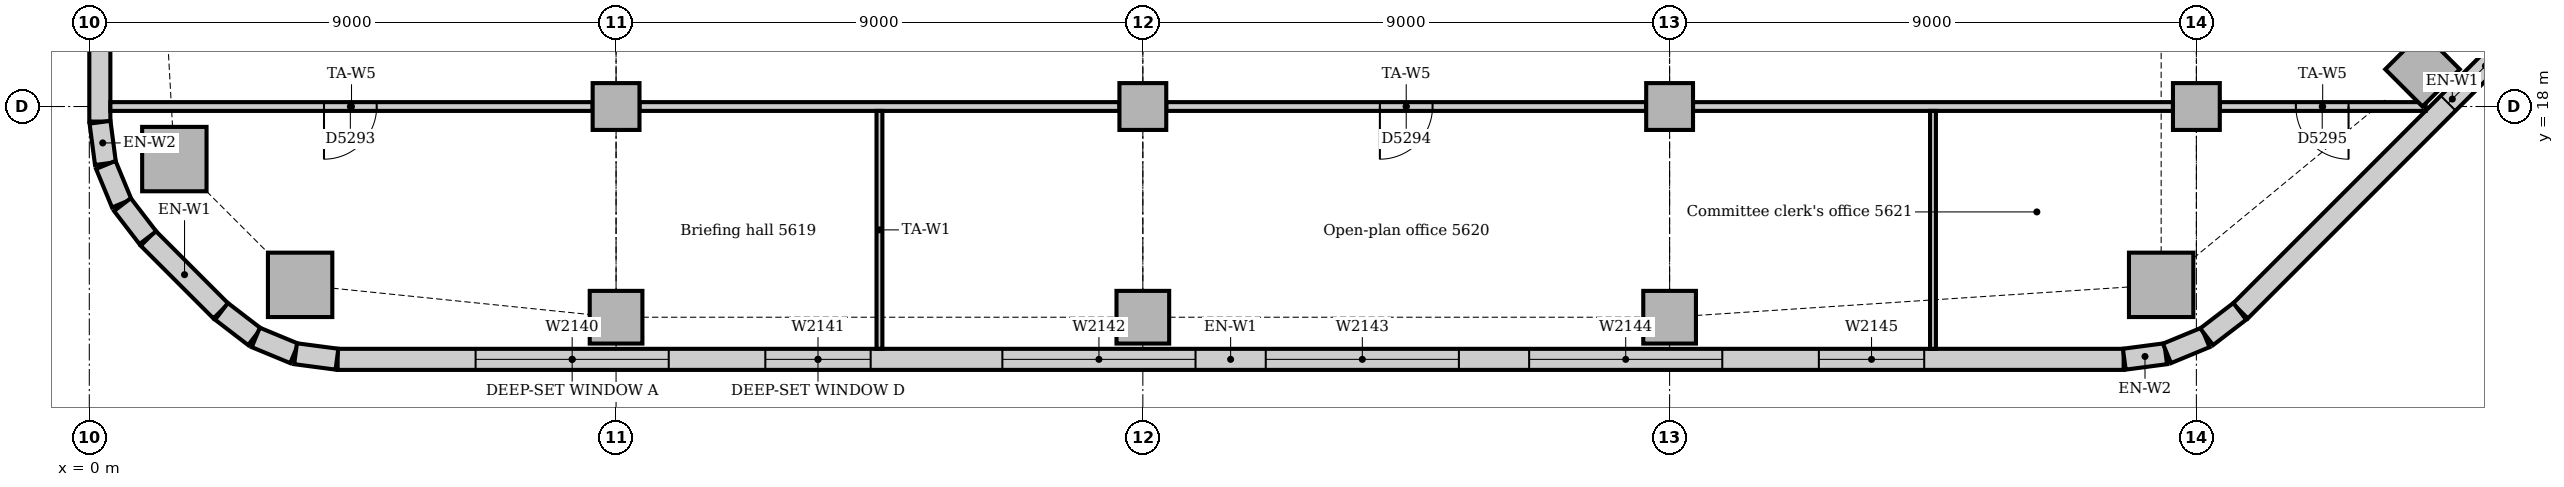
"""IFC4 building model, lengths in metres.
Left out: names, types, materials, properties, quantities, classifications, styles, units other than length and angle.
Written with IfcOpenShell. Run it as: python <this file> out.ifc"""

import sys

from ifc_helpers import new_model, si_unit, direction, frame, frame_2d, origin, origin_2d, place, context, subcontext, project, spatial, rectangle, extrude, element, fill, save


model = new_model("IFC4")
c1 = context("Model", 3, precision=1e-05, world=origin(), true_north=direction((0.0, 1.0)))
c2 = subcontext(c1, "Body", "Model", "MODEL_VIEW")
j1 = project(units=[si_unit("LENGTHUNIT", "METRE"), si_unit("PLANEANGLEUNIT", "RADIAN")], contexts=[c1])
p1 = place(None, origin())
s1 = spatial("IfcSite", under=j1, at=p1, CompositionType="ELEMENT")
p2 = place(p1, origin())
s2 = spatial("IfcBuilding", under=s1, at=p2, CompositionType="ELEMENT")
p3 = place(p2, frame((0.0, 0.0, 234.0)))
s3 = spatial("IfcBuildingStorey", under=s2, at=p3, CompositionType="ELEMENT", Elevation=234.0)
for number, where, z_axis, x_axis in (
    (1, (3.602, 14.953, 0.0), (0.0, 0.0, 1.0), (1.0, 0.0, 0.0)),
    (2, (35.398, 14.953, 0.0), (0.0, 0.0, 1.0), (1.0, 0.0, 0.0)),
    (3, (1.453, 17.102, 0.0), (0.0, 0.0, 1.0), (1.0, 0.0, 0.0)),
):
    element("IfcColumn", number, at=place(p3, frame(where, z_axis=z_axis, x_axis=x_axis)), inside=s3, PredefinedType="COLUMN", context=c2, shape_type="SweptSolid", body=[
        extrude(rectangle(XDim=1.1, YDim=1.1, at=origin_2d()), origin(), (0.0, 0.0, 1.0), 3.85),
    ])
for number, where, z_axis, x_axis in (
    (4, (9.0, 14.4, 0.0), (0.0, 0.0, 1.0), (1.0, 0.0, 0.0)),
    (5, (18.0, 14.4, 0.0), (0.0, 0.0, 1.0), (1.0, 0.0, 0.0)),
    (6, (27.0, 14.4, 0.0), (0.0, 0.0, 1.0), (1.0, 0.0, 0.0)),
    (7, (39.864, 18.636, 0.0), (0.0, 0.0, 1.0), (0.707, 0.707, 0.0)),
):
    element("IfcColumn", number, at=place(p3, frame(where, z_axis=z_axis, x_axis=x_axis)), inside=s3, PredefinedType="COLUMN", context=c2, shape_type="SweptSolid", body=[
        extrude(rectangle(XDim=0.9, YDim=0.9, at=origin_2d()), origin(), (0.0, 0.0, 1.0), 3.85),
    ])
for number, where, z_axis, x_axis in (
    (8, (9.0, 18.0, 0.0), (0.0, 0.0, 1.0), (1.0, 0.0, 0.0)),
    (9, (18.0, 18.0, 0.0), (0.0, 0.0, 1.0), (1.0, 0.0, 0.0)),
    (10, (27.0, 18.0, 0.0), (0.0, 0.0, 1.0), (1.0, 0.0, 0.0)),
    (11, (36.0, 18.0, 0.0), (0.0, 0.0, 1.0), (1.0, 0.0, 0.0)),
):
    element("IfcColumn", number, at=place(p3, frame(where, z_axis=z_axis, x_axis=x_axis)), inside=s3, PredefinedType="COLUMN", context=c2, shape_type="SweptSolid", body=[
        extrude(rectangle(XDim=0.8, YDim=0.8, at=origin_2d()), origin(), (0.0, 0.0, 1.0), 3.85),
    ])
p4 = place(p3, frame((4.243, 13.68, 0.0), z_axis=(0.0, 0.0, 1.0), x_axis=(1.0, 0.0, 0.0)))
e12 = element("IfcWall", 12, at=p4, inside=s3, PredefinedType="STANDARD", context=c2, shape_type="SweptSolid", body=[
    extrude(rectangle(XDim=30.515, YDim=0.36, at=frame_2d((15.257, 0.0))), origin(), (0.0, 0.0, 1.0), 3.85),
])
p5 = place(p4, frame((2.357, 0.0, 0.9)))
e13 = element("IfcOpeningElement", 13, at=p5, cuts=e12, PredefinedType="OPENING", context=c2, shape_type="SweptSolid", body=[
    extrude(rectangle(XDim=3.3, YDim=1.6, at=frame_2d((1.65, 0.8))), frame((0.0, 0.19, 0.0), z_axis=(0.0, -1.0, 0.0), x_axis=(1.0, 0.0, 0.0)), (0.0, 0.0, 1.0), 0.38),
])
p6 = place(p4, frame((7.307, 0.0, 0.9)))
e14 = element("IfcOpeningElement", 14, at=p6, cuts=e12, PredefinedType="OPENING", context=c2, shape_type="SweptSolid", body=[
    extrude(rectangle(XDim=1.8, YDim=1.6, at=frame_2d((0.9, 0.8))), frame((0.0, 0.19, 0.0), z_axis=(0.0, -1.0, 0.0), x_axis=(1.0, 0.0, 0.0)), (0.0, 0.0, 1.0), 0.38),
])
p7 = place(p4, frame((11.357, 0.0, 0.9)))
e15 = element("IfcOpeningElement", 15, at=p7, cuts=e12, PredefinedType="OPENING", context=c2, shape_type="SweptSolid", body=[
    extrude(rectangle(XDim=3.3, YDim=1.6, at=frame_2d((1.65, 0.8))), frame((0.0, 0.19, 0.0), z_axis=(0.0, -1.0, 0.0), x_axis=(1.0, 0.0, 0.0)), (0.0, 0.0, 1.0), 0.38),
])
p8 = place(p4, frame((15.857, 0.0, 0.9)))
e16 = element("IfcOpeningElement", 16, at=p8, cuts=e12, PredefinedType="OPENING", context=c2, shape_type="SweptSolid", body=[
    extrude(rectangle(XDim=3.3, YDim=1.6, at=frame_2d((1.65, 0.8))), frame((0.0, 0.19, 0.0), z_axis=(0.0, -1.0, 0.0), x_axis=(1.0, 0.0, 0.0)), (0.0, 0.0, 1.0), 0.38),
])
p9 = place(p4, frame((20.357, 0.0, 0.9)))
e17 = element("IfcOpeningElement", 17, at=p9, cuts=e12, PredefinedType="OPENING", context=c2, shape_type="SweptSolid", body=[
    extrude(rectangle(XDim=3.3, YDim=1.6, at=frame_2d((1.65, 0.8))), frame((0.0, 0.19, 0.0), z_axis=(0.0, -1.0, 0.0), x_axis=(1.0, 0.0, 0.0)), (0.0, 0.0, 1.0), 0.38),
])
p10 = place(p4, frame((25.307, 0.0, 0.9)))
e18 = element("IfcOpeningElement", 18, at=p10, cuts=e12, PredefinedType="OPENING", context=c2, shape_type="SweptSolid", body=[
    extrude(rectangle(XDim=1.8, YDim=1.6, at=frame_2d((0.9, 0.8))), frame((0.0, 0.19, 0.0), z_axis=(0.0, -1.0, 0.0), x_axis=(1.0, 0.0, 0.0)), (0.0, 0.0, 1.0), 0.38),
])
p11 = place(p3, frame((36.751, 14.506, 0.0), z_axis=(0.0, 0.0, 1.0), x_axis=(0.707106781187, 0.707106781187, 0.0)))
e19 = element("IfcWall", 19, at=p11, inside=s3, PredefinedType="STANDARD", context=c2, shape_type="SweptSolid", body=[
    extrude(rectangle(XDim=10.243, YDim=0.36, at=frame_2d((5.121, 0.0))), origin(), (0.0, 0.0, 1.0), 3.85),
])
p12 = place(p11, frame((5.021, 0.0, 0.9)))
e20 = element("IfcOpeningElement", 20, at=p12, cuts=e19, PredefinedType="OPENING", context=c2, shape_type="SweptSolid", body=[
    extrude(rectangle(XDim=1.8, YDim=1.6, at=frame_2d((0.9, 0.8))), frame((0.0, 0.19, 0.0), z_axis=(0.0, -1.0, 0.0), x_axis=(1.0, 0.0, 0.0)), (0.0, 0.0, 1.0), 0.38),
])
p13 = place(p3, frame((0.18, 21.0, 0.0), z_axis=(0.0, 0.0, 1.0), x_axis=(0.0, -1.0, 0.0)))
e21 = element("IfcWall", 21, at=p13, inside=s3, PredefinedType="STANDARD", context=c2, shape_type="SweptSolid", body=[
    extrude(rectangle(XDim=3.257, YDim=0.36, at=frame_2d((1.629, 0.0))), origin(), (0.0, 0.0, 1.0), 3.85),
])
p14 = place(p3, frame((1.006, 15.749, 0.0), z_axis=(0.0, 0.0, 1.0), x_axis=(0.707106781187, -0.707106781187, 0.0)))
e22 = element("IfcWall", 22, at=p14, inside=s3, PredefinedType="STANDARD", context=c2, shape_type="SweptSolid", body=[
    extrude(rectangle(XDim=1.757, YDim=0.36, at=frame_2d((0.879, 0.0))), origin(), (0.0, 0.0, 1.0), 3.85),
])
for number, where, z_axis, x_axis in (
    (23, (34.769, 13.683, 0.0), (0.0, 0.0, 1.0), (0.991, 0.131, 0.0)),
    (24, (35.497, 13.782, 0.0), (0.0, 0.0, 1.0), (0.924, 0.383, 0.0)),
):
    element("IfcWall", number, at=place(p3, frame(where, z_axis=z_axis, x_axis=x_axis)), inside=s3, PredefinedType="STANDARD", context=c2, shape_type="SweptSolid", body=[
        extrude(rectangle(XDim=0.713, YDim=0.36, at=frame_2d((0.356, 0.0))), origin(), (0.0, 0.0, 1.0), 3.85),
    ])
p15 = place(p3, frame((36.175, 14.066, 0.0), z_axis=(0.0, 0.0, 1.0), x_axis=(0.793321924995, 0.608802368033, 0.0)))
e25 = element("IfcWall", 25, at=p15, inside=s3, PredefinedType="STANDARD", context=c2, shape_type="SweptSolid", body=[
    extrude(rectangle(XDim=0.713, YDim=0.36, at=frame_2d((0.357, 0.0))), origin(), (0.0, 0.0, 1.0), 3.85),
])
for number, where, z_axis, x_axis in (
    (26, (0.183, 17.731, 0.0), (0.0, 0.0, 1.0), (0.131, -0.991, 0.0)),
    (27, (0.282, 17.003, 0.0), (0.0, 0.0, 1.0), (0.383, -0.924, 0.0)),
):
    element("IfcWall", number, at=place(p3, frame(where, z_axis=z_axis, x_axis=x_axis)), inside=s3, PredefinedType="STANDARD", context=c2, shape_type="SweptSolid", body=[
        extrude(rectangle(XDim=0.713, YDim=0.36, at=frame_2d((0.356, 0.0))), origin(), (0.0, 0.0, 1.0), 3.85),
    ])
for number, where, z_axis, x_axis in (
    (28, (0.566, 16.325, 0.0), (0.0, 0.0, 1.0), (0.609, -0.793, 0.0)),
    (29, (2.259, 14.5, 0.0), (0.0, 0.0, 1.0), (0.793, -0.609, 0.0)),
):
    element("IfcWall", number, at=place(p3, frame(where, z_axis=z_axis, x_axis=x_axis)), inside=s3, PredefinedType="STANDARD", context=c2, shape_type="SweptSolid", body=[
        extrude(rectangle(XDim=0.713, YDim=0.36, at=frame_2d((0.357, 0.0))), origin(), (0.0, 0.0, 1.0), 3.85),
    ])
for number, where, z_axis, x_axis in (
    (30, (2.844, 14.055, 0.0), (0.0, 0.0, 1.0), (0.924, -0.383, 0.0)),
    (31, (3.524, 13.776, 0.0), (0.0, 0.0, 1.0), (0.991, -0.131, 0.0)),
):
    element("IfcWall", number, at=place(p3, frame(where, z_axis=z_axis, x_axis=x_axis)), inside=s3, PredefinedType="STANDARD", context=c2, shape_type="SweptSolid", body=[
        extrude(rectangle(XDim=0.713, YDim=0.36, at=frame_2d((0.356, 0.0))), origin(), (0.0, 0.0, 1.0), 3.85),
    ])
p16 = place(p3, frame((36.4, 18.0, 0.0), z_axis=(0.0, 0.0, 1.0), x_axis=(1.0, 0.0, 0.0)))
e32 = element("IfcWall", 32, at=p16, inside=s3, PredefinedType="PARTITIONING", context=c2, shape_type="SweptSolid", body=[
    extrude(rectangle(XDim=3.516, YDim=0.15, at=frame_2d((1.758, 0.0))), origin(), (0.0, 0.0, 1.0), 3.602),
])
p17 = place(p16, frame((1.3, 0.0, 0.0)))
e33 = element("IfcOpeningElement", 33, at=p17, cuts=e32, PredefinedType="OPENING", context=c2, shape_type="SweptSolid", body=[
    extrude(rectangle(XDim=0.9, YDim=2.1, at=frame_2d((0.45, 1.05))), frame((0.0, 0.085, 0.0), z_axis=(0.0, -1.0, 0.0), x_axis=(1.0, 0.0, 0.0)), (0.0, 0.0, 1.0), 0.17),
])
p18 = place(p3, frame((27.4, 18.0, 0.0), z_axis=(0.0, 0.0, 1.0), x_axis=(1.0, 0.0, 0.0)))
e34 = element("IfcWall", 34, at=p18, inside=s3, PredefinedType="PARTITIONING", context=c2, shape_type="SweptSolid", body=[
    extrude(rectangle(XDim=8.2, YDim=0.15, at=frame_2d((4.1, 0.0))), origin(), (0.0, 0.0, 1.0), 3.254),
])
p19 = place(p3, frame((18.4, 18.0, 0.0), z_axis=(0.0, 0.0, 1.0), x_axis=(1.0, 0.0, 0.0)))
e35 = element("IfcWall", 35, at=p19, inside=s3, PredefinedType="PARTITIONING", context=c2, shape_type="SweptSolid", body=[
    extrude(rectangle(XDim=8.2, YDim=0.15, at=frame_2d((4.1, 0.0))), origin(), (0.0, 0.0, 1.0), 3.254),
])
p20 = place(p19, frame((3.65, 0.0, 0.0)))
e36 = element("IfcOpeningElement", 36, at=p20, cuts=e35, PredefinedType="OPENING", context=c2, shape_type="SweptSolid", body=[
    extrude(rectangle(XDim=0.9, YDim=2.1, at=frame_2d((0.45, 1.05))), frame((0.0, 0.085, 0.0), z_axis=(0.0, -1.0, 0.0), x_axis=(1.0, 0.0, 0.0)), (0.0, 0.0, 1.0), 0.17),
])
p21 = place(p3, frame((9.4, 18.0, 0.0), z_axis=(0.0, 0.0, 1.0), x_axis=(1.0, 0.0, 0.0)))
e37 = element("IfcWall", 37, at=p21, inside=s3, PredefinedType="PARTITIONING", context=c2, shape_type="SweptSolid", body=[
    extrude(rectangle(XDim=8.2, YDim=0.15, at=frame_2d((4.1, 0.0))), origin(), (0.0, 0.0, 1.0), 3.254),
])
p22 = place(p3, frame((0.36, 18.0, 0.0), z_axis=(0.0, 0.0, 1.0), x_axis=(1.0, 0.0, 0.0)))
e38 = element("IfcWall", 38, at=p22, inside=s3, PredefinedType="PARTITIONING", context=c2, shape_type="SweptSolid", body=[
    extrude(rectangle(XDim=8.24, YDim=0.15, at=frame_2d((4.12, 0.0))), origin(), (0.0, 0.0, 1.0), 3.254),
])
p23 = place(p22, frame((3.65, 0.0, 0.0)))
e39 = element("IfcOpeningElement", 39, at=p23, cuts=e38, PredefinedType="OPENING", context=c2, shape_type="SweptSolid", body=[
    extrude(rectangle(XDim=0.9, YDim=2.1, at=frame_2d((0.45, 1.05))), frame((0.0, 0.085, 0.0), z_axis=(0.0, -1.0, 0.0), x_axis=(1.0, 0.0, 0.0)), (0.0, 0.0, 1.0), 0.17),
])
for number, where, z_axis, x_axis in (
    (40, (13.5, 13.86, 0.0), (0.0, 0.0, 1.0), (0.0, 1.0, 0.0)),
    (41, (31.5, 13.86, 0.0), (0.0, 0.0, 1.0), (0.0, 1.0, 0.0)),
):
    element("IfcWall", number, at=place(p3, frame(where, z_axis=z_axis, x_axis=x_axis)), inside=s3, PredefinedType="PARTITIONING", context=c2, shape_type="SweptSolid", body=[
        extrude(rectangle(XDim=4.065, YDim=0.1, at=frame_2d((2.033, 0.0))), origin(), (0.0, 0.0, 1.0), 3.85),
    ])
p24 = place(p5, origin())
e42 = element("IfcWindow", 42, at=p24, inside=s3, PartitioningType="SINGLE_PANEL", PredefinedType="WINDOW", context=c2, shape_type="SweptSolid", body=[
    extrude(rectangle(XDim=3.3, YDim=1.6, at=frame_2d((1.65, 0.8))), frame((0.0, 0.13, 0.0), z_axis=(0.0, -1.0, 0.0), x_axis=(1.0, 0.0, 0.0)), (0.0, 0.0, 1.0), 0.06),
])
fill(e13, e42)
p25 = place(p6, origin())
e43 = element("IfcWindow", 43, at=p25, inside=s3, PartitioningType="SINGLE_PANEL", PredefinedType="WINDOW", context=c2, shape_type="SweptSolid", body=[
    extrude(rectangle(XDim=1.8, YDim=1.6, at=frame_2d((0.9, 0.8))), frame((0.0, 0.13, 0.0), z_axis=(0.0, -1.0, 0.0), x_axis=(1.0, 0.0, 0.0)), (0.0, 0.0, 1.0), 0.06),
])
fill(e14, e43)
p26 = place(p7, origin())
e44 = element("IfcWindow", 44, at=p26, inside=s3, PartitioningType="SINGLE_PANEL", PredefinedType="WINDOW", context=c2, shape_type="SweptSolid", body=[
    extrude(rectangle(XDim=3.3, YDim=1.6, at=frame_2d((1.65, 0.8))), frame((0.0, 0.13, 0.0), z_axis=(0.0, -1.0, 0.0), x_axis=(1.0, 0.0, 0.0)), (0.0, 0.0, 1.0), 0.06),
])
fill(e15, e44)
p27 = place(p8, origin())
e45 = element("IfcWindow", 45, at=p27, inside=s3, PartitioningType="SINGLE_PANEL", PredefinedType="WINDOW", context=c2, shape_type="SweptSolid", body=[
    extrude(rectangle(XDim=3.3, YDim=1.6, at=frame_2d((1.65, 0.8))), frame((0.0, 0.13, 0.0), z_axis=(0.0, -1.0, 0.0), x_axis=(1.0, 0.0, 0.0)), (0.0, 0.0, 1.0), 0.06),
])
fill(e16, e45)
p28 = place(p9, origin())
e46 = element("IfcWindow", 46, at=p28, inside=s3, PartitioningType="SINGLE_PANEL", PredefinedType="WINDOW", context=c2, shape_type="SweptSolid", body=[
    extrude(rectangle(XDim=3.3, YDim=1.6, at=frame_2d((1.65, 0.8))), frame((0.0, 0.13, 0.0), z_axis=(0.0, -1.0, 0.0), x_axis=(1.0, 0.0, 0.0)), (0.0, 0.0, 1.0), 0.06),
])
fill(e17, e46)
p29 = place(p10, origin())
e47 = element("IfcWindow", 47, at=p29, inside=s3, PartitioningType="SINGLE_PANEL", PredefinedType="WINDOW", context=c2, shape_type="SweptSolid", body=[
    extrude(rectangle(XDim=1.8, YDim=1.6, at=frame_2d((0.9, 0.8))), frame((0.0, 0.13, 0.0), z_axis=(0.0, -1.0, 0.0), x_axis=(1.0, 0.0, 0.0)), (0.0, 0.0, 1.0), 0.06),
])
fill(e18, e47)
p30 = place(p12, origin())
e48 = element("IfcWindow", 48, at=p30, inside=s3, PartitioningType="SINGLE_PANEL", PredefinedType="WINDOW", context=c2, shape_type="SweptSolid", body=[
    extrude(rectangle(XDim=1.8, YDim=1.6, at=frame_2d((0.9, 0.8))), frame((0.0, 0.13, 0.0), z_axis=(0.0, -1.0, 0.0), x_axis=(1.0, 0.0, 0.0)), (0.0, 0.0, 1.0), 0.06),
])
fill(e20, e48)
p31 = place(p23, frame((0.9, 0.0, 0.0), z_axis=(0.0, 0.0, 1.0), x_axis=(-1.0, 0.0, 0.0)))
e49 = element("IfcDoor", 49, at=p31, inside=s3, OperationType="SINGLE_SWING_RIGHT", PredefinedType="DOOR", context=c2, shape_type="SweptSolid", body=[
    extrude(rectangle(XDim=0.9, YDim=2.1, at=frame_2d((0.45, 1.05))), frame((0.0, 0.025, 0.0), z_axis=(0.0, -1.0, 0.0), x_axis=(1.0, 0.0, 0.0)), (0.0, 0.0, 1.0), 0.05),
])
fill(e39, e49)
p32 = place(p20, frame((0.9, 0.0, 0.0), z_axis=(0.0, 0.0, 1.0), x_axis=(-1.0, 0.0, 0.0)))
e50 = element("IfcDoor", 50, at=p32, inside=s3, OperationType="SINGLE_SWING_RIGHT", PredefinedType="DOOR", context=c2, shape_type="SweptSolid", body=[
    extrude(rectangle(XDim=0.9, YDim=2.1, at=frame_2d((0.45, 1.05))), frame((0.0, 0.025, 0.0), z_axis=(0.0, -1.0, 0.0), x_axis=(1.0, 0.0, 0.0)), (0.0, 0.0, 1.0), 0.05),
])
fill(e36, e50)
p33 = place(p17, frame((0.9, 0.0, 0.0), z_axis=(0.0, 0.0, 1.0), x_axis=(-1.0, 0.0, 0.0)))
e51 = element("IfcDoor", 51, at=p33, inside=s3, OperationType="SINGLE_SWING_LEFT", PredefinedType="DOOR", context=c2, shape_type="SweptSolid", body=[
    extrude(rectangle(XDim=0.9, YDim=2.1, at=frame_2d((0.45, 1.05))), frame((0.0, 0.025, 0.0), z_axis=(0.0, -1.0, 0.0), x_axis=(1.0, 0.0, 0.0)), (0.0, 0.0, 1.0), 0.05),
])
fill(e33, e51)
save(model, sys.argv[1])
